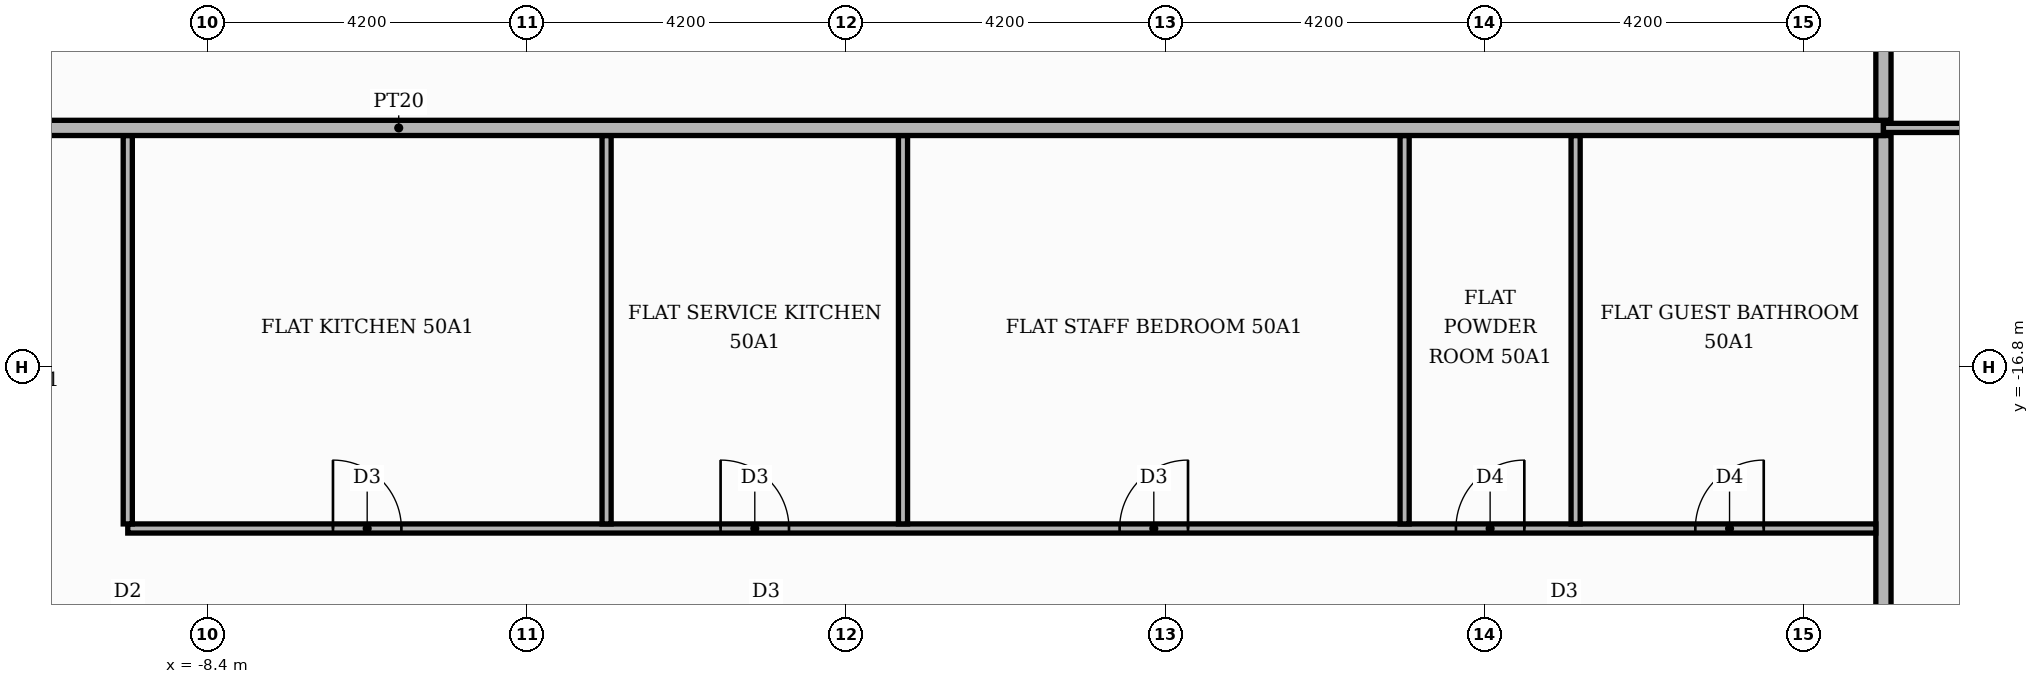
"""IFC4 building model, lengths in metres.
Left out: names, types, materials, properties, quantities, classifications, styles, units other than length and angle.
Written with IfcOpenShell. Run it as: python <this file> out.ifc"""

import sys

from ifc_helpers import new_model, si_unit, direction, frame, frame_2d, origin, place, context, subcontext, project, spatial, rectangle, extrude, element, fill, save


model = new_model("IFC4")
c1 = context("Model", 3, precision=1e-05, world=origin(), true_north=direction((0.0, 1.0)))
c2 = subcontext(c1, "Body", "Model", "MODEL_VIEW")
j1 = project(units=[si_unit("LENGTHUNIT", "METRE"), si_unit("PLANEANGLEUNIT", "RADIAN")], contexts=[c1])
p1 = place(None, origin())
s1 = spatial("IfcSite", under=j1, at=p1, CompositionType="ELEMENT")
p2 = place(p1, origin())
s2 = spatial("IfcBuilding", under=s1, at=p2, CompositionType="ELEMENT")
p3 = place(p2, frame((0.0, 0.0, 211.8)))
s3 = spatial("IfcBuildingStorey", under=s2, at=p3, CompositionType="ELEMENT", Elevation=211.8)
p4 = place(p3, frame((13.65, -25.42, 0.0), z_axis=(0.0, 0.0, 1.0), x_axis=(0.0, 1.0, 0.0)))
e1 = element("IfcWall", 1, at=p4, inside=s3, PredefinedType="PARTITIONING", context=c2, shape_type="SweptSolid", body=[
    extrude(rectangle(XDim=11.67, YDim=0.2, at=frame_2d((5.835, 0.0))), origin(), (0.0, 0.0, 1.0), 3.48),
])
p5 = place(p3, frame((-9.45, -18.92, 0.0), z_axis=(0.0, 0.0, 1.0), x_axis=(1.0, 0.0, 0.0)))
e2 = element("IfcWall", 2, at=p5, inside=s3, PredefinedType="PARTITIONING", context=c2, shape_type="SweptSolid", body=[
    extrude(rectangle(XDim=23.0, YDim=0.12, at=frame_2d((11.5, 0.0))), origin(), (0.0, 0.0, 1.0), 3.48),
])
p6 = place(p5, frame((2.7, 0.0, 0.0)))
e3 = element("IfcOpeningElement", 3, at=p6, cuts=e2, PredefinedType="OPENING", context=c2, shape_type="SweptSolid", body=[
    extrude(rectangle(XDim=0.9, YDim=2.1, at=frame_2d((0.45, 1.05))), frame((0.0, 0.07, 0.0), z_axis=(0.0, -1.0, 0.0), x_axis=(1.0, 0.0, 0.0)), (0.0, 0.0, 1.0), 0.14),
])
p7 = place(p5, frame((7.8, 0.0, 0.0)))
e4 = element("IfcOpeningElement", 4, at=p7, cuts=e2, PredefinedType="OPENING", context=c2, shape_type="SweptSolid", body=[
    extrude(rectangle(XDim=0.9, YDim=2.1, at=frame_2d((0.45, 1.05))), frame((0.0, 0.07, 0.0), z_axis=(0.0, -1.0, 0.0), x_axis=(1.0, 0.0, 0.0)), (0.0, 0.0, 1.0), 0.14),
])
p8 = place(p5, frame((13.05, 0.0, 0.0)))
e5 = element("IfcOpeningElement", 5, at=p8, cuts=e2, PredefinedType="OPENING", context=c2, shape_type="SweptSolid", body=[
    extrude(rectangle(XDim=0.9, YDim=2.1, at=frame_2d((0.45, 1.05))), frame((0.0, 0.07, 0.0), z_axis=(0.0, -1.0, 0.0), x_axis=(1.0, 0.0, 0.0)), (0.0, 0.0, 1.0), 0.14),
])
p9 = place(p5, frame((17.475, 0.0, 0.0)))
e6 = element("IfcOpeningElement", 6, at=p9, cuts=e2, PredefinedType="OPENING", context=c2, shape_type="SweptSolid", body=[
    extrude(rectangle(XDim=0.9, YDim=2.1, at=frame_2d((0.45, 1.05))), frame((0.0, 0.07, 0.0), z_axis=(0.0, -1.0, 0.0), x_axis=(1.0, 0.0, 0.0)), (0.0, 0.0, 1.0), 0.14),
])
p10 = place(p5, frame((20.625, 0.0, 0.0)))
e7 = element("IfcOpeningElement", 7, at=p10, cuts=e2, PredefinedType="OPENING", context=c2, shape_type="SweptSolid", body=[
    extrude(rectangle(XDim=0.9, YDim=2.1, at=frame_2d((0.45, 1.05))), frame((0.0, 0.07, 0.0), z_axis=(0.0, -1.0, 0.0), x_axis=(1.0, 0.0, 0.0)), (0.0, 0.0, 1.0), 0.14),
])
for number, where, z_axis, x_axis in (
    (8, (-9.45, -18.86, 0.0), (0.0, 0.0, 1.0), (0.0, 1.0, 0.0)),
    (9, (-3.15, -18.86, 0.0), (0.0, 0.0, 1.0), (0.0, 1.0, 0.0)),
    (10, (0.75, -18.86, 0.0), (0.0, 0.0, 1.0), (0.0, 1.0, 0.0)),
    (11, (7.35, -18.86, 0.0), (0.0, 0.0, 1.0), (0.0, 1.0, 0.0)),
    (12, (9.6, -18.86, 0.0), (0.0, 0.0, 1.0), (0.0, 1.0, 0.0)),
):
    element("IfcWall", number, at=place(p3, frame(where, z_axis=z_axis, x_axis=x_axis)), inside=s3, PredefinedType="PARTITIONING", context=c2, shape_type="SweptSolid", body=[
        extrude(rectangle(XDim=5.11, YDim=0.12, at=frame_2d((2.555, 0.0))), origin(), (0.0, 0.0, 1.0), 3.48),
    ])
p11 = place(p3, frame((-25.42, -13.65, 0.0), z_axis=(0.0, 0.0, 1.0), x_axis=(1.0, 0.0, 0.0)))
e13 = element("IfcWall", 13, at=p11, inside=s3, PredefinedType="PARTITIONING", context=c2, shape_type="SweptSolid", body=[
    extrude(rectangle(XDim=39.07, YDim=0.2, at=frame_2d((19.535, 0.0))), origin(), (0.0, 0.0, 1.0), 3.48),
])
p12 = place(p11, frame((13.32, 0.0, 0.0)))
e14 = element("IfcOpeningElement", 14, at=p12, cuts=e13, PredefinedType="OPENING", context=c2, shape_type="SweptSolid", body=[
    extrude(rectangle(XDim=1.1, YDim=2.4, at=frame_2d((0.55, 1.2))), frame((0.0, 0.11, 0.0), z_axis=(0.0, -1.0, 0.0), x_axis=(1.0, 0.0, 0.0)), (0.0, 0.0, 1.0), 0.22),
])
p13 = place(p3, frame((13.65, -13.65, 0.0), z_axis=(0.0, 0.0, 1.0), x_axis=(1.0, 0.0, 0.0)))
e15 = element("IfcWall", 15, at=p13, inside=s3, PredefinedType="PARTITIONING", context=c2, shape_type="SweptSolid", body=[
    extrude(rectangle(XDim=6.47, YDim=0.12, at=frame_2d((3.235, 0.0))), origin(), (0.0, 0.0, 1.0), 3.48),
])
p14 = place(p13, frame((2.785, 0.0, 0.0)))
e16 = element("IfcOpeningElement", 16, at=p14, cuts=e15, PredefinedType="OPENING", context=c2, shape_type="SweptSolid", body=[
    extrude(rectangle(XDim=0.9, YDim=2.1, at=frame_2d((0.45, 1.05))), frame((0.0, 0.07, 0.0), z_axis=(0.0, -1.0, 0.0), x_axis=(1.0, 0.0, 0.0)), (0.0, 0.0, 1.0), 0.14),
])
p15 = place(p3, frame((13.65, -13.55, 0.0), z_axis=(0.0, 0.0, 1.0), x_axis=(0.0, 1.0, 0.0)))
e17 = element("IfcWall", 17, at=p15, inside=s3, PredefinedType="PARTITIONING", context=c2, shape_type="SweptSolid", body=[
    extrude(rectangle(XDim=2.45, YDim=0.2, at=frame_2d((1.225, 0.0))), origin(), (0.0, 0.0, 1.0), 3.48),
])
p16 = place(p6, origin())
e18 = element("IfcDoor", 18, at=p16, inside=s3, OperationType="SINGLE_SWING_LEFT", PredefinedType="DOOR", context=c2, shape_type="SweptSolid", body=[
    extrude(rectangle(XDim=0.9, YDim=2.1, at=frame_2d((0.45, 1.05))), frame((0.0, 0.025, 0.0), z_axis=(0.0, -1.0, 0.0), x_axis=(1.0, 0.0, 0.0)), (0.0, 0.0, 1.0), 0.05),
])
fill(e3, e18)
p17 = place(p7, origin())
e19 = element("IfcDoor", 19, at=p17, inside=s3, OperationType="SINGLE_SWING_LEFT", PredefinedType="DOOR", context=c2, shape_type="SweptSolid", body=[
    extrude(rectangle(XDim=0.9, YDim=2.1, at=frame_2d((0.45, 1.05))), frame((0.0, 0.025, 0.0), z_axis=(0.0, -1.0, 0.0), x_axis=(1.0, 0.0, 0.0)), (0.0, 0.0, 1.0), 0.05),
])
fill(e4, e19)
p18 = place(p8, origin())
e20 = element("IfcDoor", 20, at=p18, inside=s3, OperationType="SINGLE_SWING_RIGHT", PredefinedType="DOOR", context=c2, shape_type="SweptSolid", body=[
    extrude(rectangle(XDim=0.9, YDim=2.1, at=frame_2d((0.45, 1.05))), frame((0.0, 0.025, 0.0), z_axis=(0.0, -1.0, 0.0), x_axis=(1.0, 0.0, 0.0)), (0.0, 0.0, 1.0), 0.05),
])
fill(e5, e20)
p19 = place(p9, origin())
e21 = element("IfcDoor", 21, at=p19, inside=s3, OperationType="SINGLE_SWING_RIGHT", PredefinedType="DOOR", context=c2, shape_type="SweptSolid", body=[
    extrude(rectangle(XDim=0.9, YDim=2.1, at=frame_2d((0.45, 1.05))), frame((0.0, 0.025, 0.0), z_axis=(0.0, -1.0, 0.0), x_axis=(1.0, 0.0, 0.0)), (0.0, 0.0, 1.0), 0.05),
])
fill(e6, e21)
p20 = place(p10, origin())
e22 = element("IfcDoor", 22, at=p20, inside=s3, OperationType="SINGLE_SWING_RIGHT", PredefinedType="DOOR", context=c2, shape_type="SweptSolid", body=[
    extrude(rectangle(XDim=0.9, YDim=2.1, at=frame_2d((0.45, 1.05))), frame((0.0, 0.025, 0.0), z_axis=(0.0, -1.0, 0.0), x_axis=(1.0, 0.0, 0.0)), (0.0, 0.0, 1.0), 0.05),
])
fill(e7, e22)
save(model, sys.argv[1])
